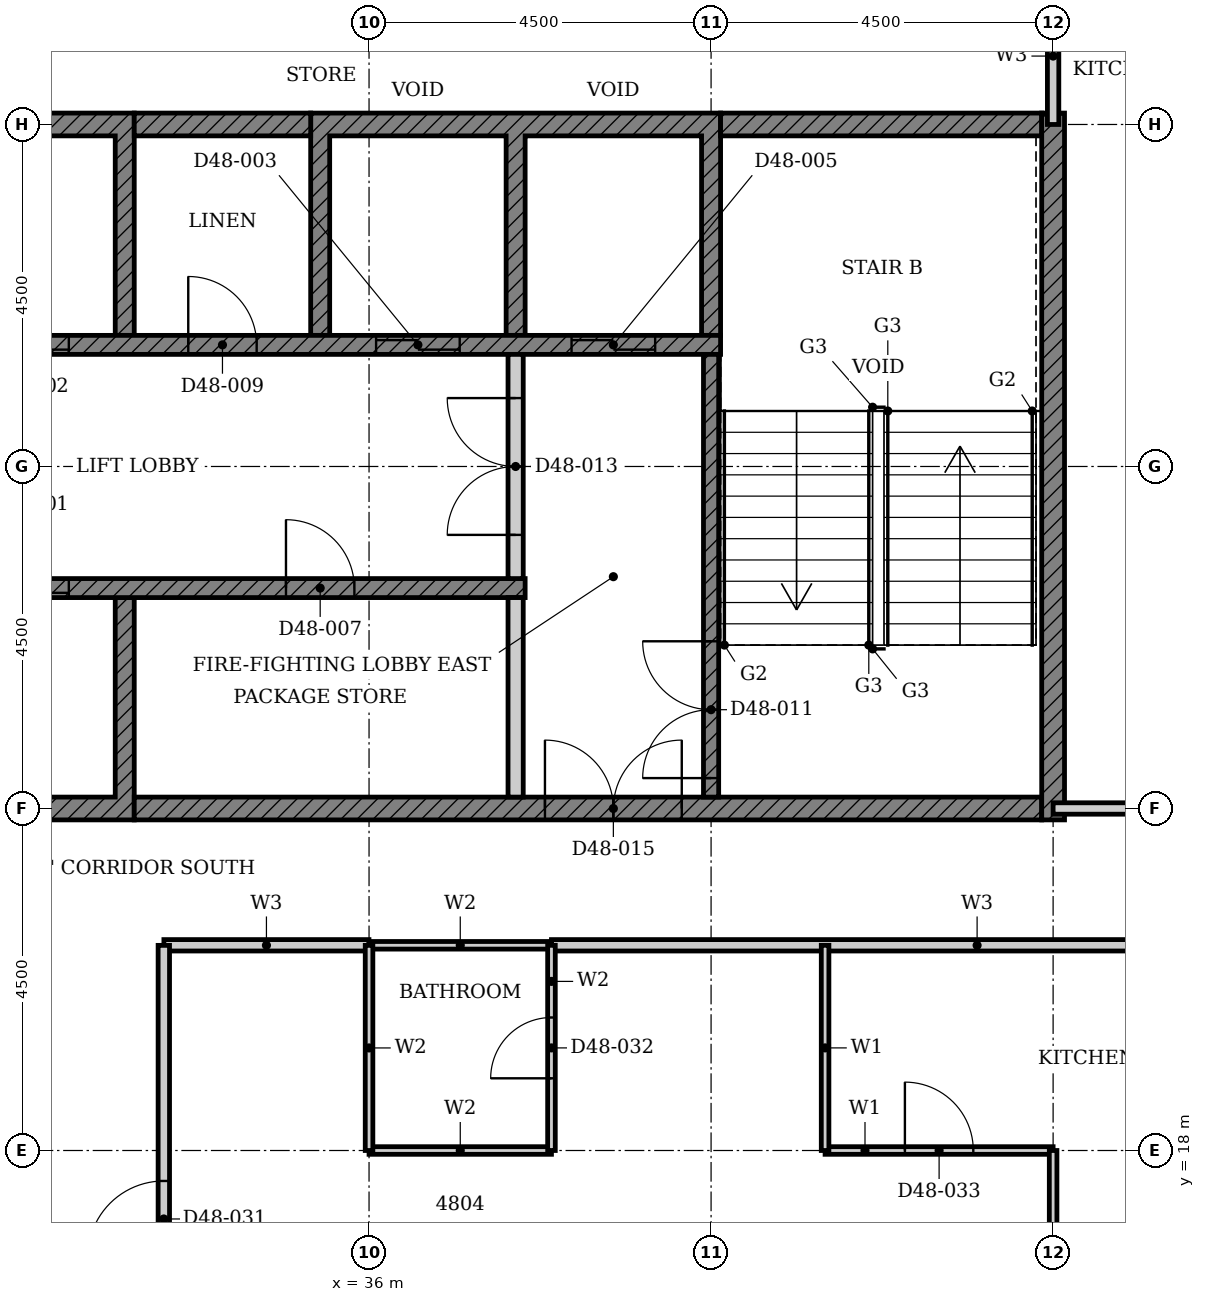
"""IFC4 building model, lengths in metres.
Left out: names, types, materials, properties, quantities, classifications, styles, units other than length and angle.
Written with IfcOpenShell. Run it as: python <this file> out.ifc"""

import sys

from ifc_helpers import new_model, si_unit, direction, frame, frame_2d, origin, place, context, subcontext, project, spatial, polyline, rectangle, outline, extrude, element, fill, save


model = new_model("IFC4")
c1 = context("Model", 3, precision=1e-05, world=origin(), true_north=direction((0.0, 1.0)))
c2 = subcontext(c1, "Body", "Model", "MODEL_VIEW")
j1 = project(units=[si_unit("LENGTHUNIT", "METRE"), si_unit("PLANEANGLEUNIT", "RADIAN")], contexts=[c1])
p1 = place(None, origin())
s1 = spatial("IfcSite", under=j1, at=p1, CompositionType="ELEMENT")
p2 = place(p1, origin())
s2 = spatial("IfcBuilding", under=s1, at=p2, CompositionType="ELEMENT")
p3 = place(p2, frame((0.0, 0.0, 192.4)))
s3 = spatial("IfcBuildingStorey", under=s2, at=p3, CompositionType="ELEMENT", Elevation=192.4)
p4 = place(p3, origin())
e1 = element("IfcWall", 1, at=p4, inside=s3, PredefinedType="SHEAR", context=c2, shape_type="SweptSolid", body=[
    extrude(outline(polyline([(27.518, 22.35), (32.911, 22.35), (32.911, 25.275), (32.661, 25.275), (32.661, 22.65), (30.339, 22.65), (30.339, 25.275), (30.089, 25.275), (30.089, 22.65), (27.768, 22.65), (27.768, 25.275), (27.518, 25.275), (27.518, 22.35)])), origin(), (0.0, 0.0, 1.0), 3.4),
])
p5 = place(p3, origin())
e2 = element("IfcWall", 2, at=p5, inside=s3, PredefinedType="SHEAR", context=c2, shape_type="SweptSolid", body=[
    extrude(outline(polyline([(27.518, 28.725), (27.768, 28.725), (27.768, 31.35), (30.089, 31.35), (30.089, 28.725), (30.339, 28.725), (30.339, 31.35), (32.661, 31.35), (32.661, 28.725), (32.911, 28.725), (32.911, 31.65), (27.518, 31.65), (27.518, 28.725)])), origin(), (0.0, 0.0, 1.0), 3.4),
])
p6 = place(p3, origin())
e3 = element("IfcWall", 3, at=p6, inside=s3, PredefinedType="SHEAR", context=c2, shape_type="SweptSolid", body=[
    extrude(outline(polyline([(35.232, 28.725), (35.482, 28.725), (35.482, 31.35), (37.803, 31.35), (37.803, 28.725), (38.053, 28.725), (38.053, 31.35), (40.375, 31.35), (40.375, 28.725), (40.625, 28.725), (40.625, 31.65), (35.232, 31.65), (35.232, 28.725)])), origin(), (0.0, 0.0, 1.0), 3.4),
])
p7 = place(p3, frame((32.911, 22.5, 0.0), z_axis=(0.0, 0.0, 1.0), x_axis=(1.0, 0.0, 0.0)))
e4 = element("IfcWall", 4, at=p7, inside=s3, PredefinedType="SHEAR", context=c2, shape_type="SweptSolid", body=[
    extrude(rectangle(XDim=11.939, YDim=0.3, at=frame_2d((5.97, 0.0))), origin(), (0.0, 0.0, 1.0), 3.4),
])
p8 = place(p7, frame((5.404, 0.0, 0.0)))
e5 = element("IfcOpeningElement", 5, at=p8, cuts=e4, PredefinedType="OPENING", context=c2, shape_type="SweptSolid", body=[
    extrude(rectangle(XDim=1.8, YDim=2.1, at=frame_2d((0.9, 1.05))), frame((0.0, 0.16, 0.0), z_axis=(0.0, -1.0, 0.0), x_axis=(1.0, 0.0, 0.0)), (0.0, 0.0, 1.0), 0.32),
])
p9 = place(p3, frame((32.911, 31.5, 0.0), z_axis=(0.0, 0.0, 1.0), x_axis=(1.0, 0.0, 0.0)))
e6 = element("IfcWall", 6, at=p9, inside=s3, PredefinedType="SHEAR", context=c2, shape_type="SweptSolid", body=[
    extrude(rectangle(XDim=2.322, YDim=0.3, at=frame_2d((1.161, 0.0))), origin(), (0.0, 0.0, 1.0), 3.4),
])
p10 = place(p3, frame((40.625, 31.5, 0.0), z_axis=(0.0, 0.0, 1.0), x_axis=(1.0, 0.0, 0.0)))
e7 = element("IfcWall", 7, at=p10, inside=s3, PredefinedType="SHEAR", context=c2, shape_type="SweptSolid", body=[
    extrude(rectangle(XDim=4.225, YDim=0.3, at=frame_2d((2.113, 0.0))), origin(), (0.0, 0.0, 1.0), 3.4),
])
p11 = place(p3, frame((45.0, 22.35, 0.0), z_axis=(0.0, 0.0, 1.0), x_axis=(0.0, 1.0, 0.0)))
e8 = element("IfcWall", 8, at=p11, inside=s3, PredefinedType="SHEAR", context=c2, shape_type="SweptSolid", body=[
    extrude(rectangle(XDim=9.3, YDim=0.3, at=frame_2d((4.65, 0.0))), origin(), (0.0, 0.0, 1.0), 3.4),
])
p12 = place(p3, frame((22.375, 25.4, 0.0), z_axis=(0.0, 0.0, 1.0), x_axis=(1.0, 0.0, 0.0)))
e9 = element("IfcWall", 9, at=p12, inside=s3, PredefinedType="SHEAR", context=c2, shape_type="SweptSolid", body=[
    extrude(rectangle(XDim=15.678, YDim=0.25, at=frame_2d((7.839, 0.0))), origin(), (0.0, 0.0, 1.0), 3.4),
])
p13 = place(p12, frame((8.575, 0.0, 0.0)))
e10 = element("IfcOpeningElement", 10, at=p13, cuts=e9, PredefinedType="OPENING", context=c2, shape_type="SweptSolid", body=[
    extrude(rectangle(XDim=1.1, YDim=2.1, at=frame_2d((0.55, 1.05))), frame((0.0, 0.135, 0.0), z_axis=(0.0, -1.0, 0.0), x_axis=(1.0, 0.0, 0.0)), (0.0, 0.0, 1.0), 0.27),
])
p14 = place(p12, frame((0.861, 0.0, 0.0)))
e11 = element("IfcOpeningElement", 11, at=p14, cuts=e9, PredefinedType="OPENING", context=c2, shape_type="SweptSolid", body=[
    extrude(rectangle(XDim=1.1, YDim=2.1, at=frame_2d((0.55, 1.05))), frame((0.0, 0.135, 0.0), z_axis=(0.0, -1.0, 0.0), x_axis=(1.0, 0.0, 0.0)), (0.0, 0.0, 1.0), 0.27),
])
p15 = place(p12, frame((3.532, 0.0, 0.0)))
e12 = element("IfcOpeningElement", 12, at=p15, cuts=e9, PredefinedType="OPENING", context=c2, shape_type="SweptSolid", body=[
    extrude(rectangle(XDim=0.9, YDim=2.1, at=frame_2d((0.45, 1.05))), frame((0.0, 0.135, 0.0), z_axis=(0.0, -1.0, 0.0), x_axis=(1.0, 0.0, 0.0)), (0.0, 0.0, 1.0), 0.27),
])
p16 = place(p12, frame((12.532, 0.0, 0.0)))
e13 = element("IfcOpeningElement", 13, at=p16, cuts=e9, PredefinedType="OPENING", context=c2, shape_type="SweptSolid", body=[
    extrude(rectangle(XDim=0.9, YDim=2.1, at=frame_2d((0.45, 1.05))), frame((0.0, 0.135, 0.0), z_axis=(0.0, -1.0, 0.0), x_axis=(1.0, 0.0, 0.0)), (0.0, 0.0, 1.0), 0.27),
])
p17 = place(p3, frame((24.947, 28.6, 0.0), z_axis=(0.0, 0.0, 1.0), x_axis=(1.0, 0.0, 0.0)))
e14 = element("IfcWall", 14, at=p17, inside=s3, PredefinedType="SHEAR", context=c2, shape_type="SweptSolid", body=[
    extrude(rectangle(XDim=15.678, YDim=0.25, at=frame_2d((7.839, 0.0))), origin(), (0.0, 0.0, 1.0), 3.4),
])
p18 = place(p17, frame((6.004, 0.0, 0.0)))
e15 = element("IfcOpeningElement", 15, at=p18, cuts=e14, PredefinedType="OPENING", context=c2, shape_type="SweptSolid", body=[
    extrude(rectangle(XDim=1.1, YDim=2.1, at=frame_2d((0.55, 1.05))), frame((0.0, 0.135, 0.0), z_axis=(0.0, -1.0, 0.0), x_axis=(1.0, 0.0, 0.0)), (0.0, 0.0, 1.0), 0.27),
])
p19 = place(p17, frame((11.146, 0.0, 0.0)))
e16 = element("IfcOpeningElement", 16, at=p19, cuts=e14, PredefinedType="OPENING", context=c2, shape_type="SweptSolid", body=[
    extrude(rectangle(XDim=1.1, YDim=2.1, at=frame_2d((0.55, 1.05))), frame((0.0, 0.135, 0.0), z_axis=(0.0, -1.0, 0.0), x_axis=(1.0, 0.0, 0.0)), (0.0, 0.0, 1.0), 0.27),
])
p20 = place(p17, frame((13.718, 0.0, 0.0)))
e17 = element("IfcOpeningElement", 17, at=p20, cuts=e14, PredefinedType="OPENING", context=c2, shape_type="SweptSolid", body=[
    extrude(rectangle(XDim=1.1, YDim=2.1, at=frame_2d((0.55, 1.05))), frame((0.0, 0.135, 0.0), z_axis=(0.0, -1.0, 0.0), x_axis=(1.0, 0.0, 0.0)), (0.0, 0.0, 1.0), 0.27),
])
p21 = place(p17, frame((0.961, 0.0, 0.0)))
e18 = element("IfcOpeningElement", 18, at=p21, cuts=e14, PredefinedType="OPENING", context=c2, shape_type="SweptSolid", body=[
    extrude(rectangle(XDim=0.9, YDim=2.1, at=frame_2d((0.45, 1.05))), frame((0.0, 0.135, 0.0), z_axis=(0.0, -1.0, 0.0), x_axis=(1.0, 0.0, 0.0)), (0.0, 0.0, 1.0), 0.27),
])
p22 = place(p17, frame((8.675, 0.0, 0.0)))
e19 = element("IfcOpeningElement", 19, at=p22, cuts=e14, PredefinedType="OPENING", context=c2, shape_type="SweptSolid", body=[
    extrude(rectangle(XDim=0.9, YDim=2.1, at=frame_2d((0.45, 1.05))), frame((0.0, 0.135, 0.0), z_axis=(0.0, -1.0, 0.0), x_axis=(1.0, 0.0, 0.0)), (0.0, 0.0, 1.0), 0.27),
])
p23 = place(p3, frame((37.928, 22.65, 0.0), z_axis=(0.0, 0.0, 1.0), x_axis=(0.0, 1.0, 0.0)))
e20 = element("IfcWall", 20, at=p23, inside=s3, PredefinedType="PARTITIONING", context=c2, shape_type="SweptSolid", body=[
    extrude(rectangle(XDim=2.625, YDim=0.2, at=frame_2d((1.312, 0.0))), origin(), (0.0, 0.0, 1.0), 3.4),
])
p24 = place(p3, frame((40.5, 22.65, 0.0), z_axis=(0.0, 0.0, 1.0), x_axis=(0.0, 1.0, 0.0)))
e21 = element("IfcWall", 21, at=p24, inside=s3, PredefinedType="SHEAR", context=c2, shape_type="SweptSolid", body=[
    extrude(rectangle(XDim=5.825, YDim=0.2, at=frame_2d((2.913, 0.0))), origin(), (0.0, 0.0, 1.0), 3.4),
])
p25 = place(p24, frame((0.25, 0.0, 0.0)))
e22 = element("IfcOpeningElement", 22, at=p25, cuts=e21, PredefinedType="OPENING", context=c2, shape_type="SweptSolid", body=[
    extrude(rectangle(XDim=1.8, YDim=2.1, at=frame_2d((0.9, 1.05))), frame((0.0, 0.11, 0.0), z_axis=(0.0, -1.0, 0.0), x_axis=(1.0, 0.0, 0.0)), (0.0, 0.0, 1.0), 0.22),
])
p26 = place(p3, frame((37.928, 25.525, 0.0), z_axis=(0.0, 0.0, 1.0), x_axis=(0.0, 1.0, 0.0)))
e23 = element("IfcWall", 23, at=p26, inside=s3, PredefinedType="PARTITIONING", context=c2, shape_type="SweptSolid", body=[
    extrude(rectangle(XDim=2.95, YDim=0.2, at=frame_2d((1.475, 0.0))), origin(), (0.0, 0.0, 1.0), 3.4),
])
p27 = place(p26, frame((0.575, 0.0, 0.0)))
e24 = element("IfcOpeningElement", 24, at=p27, cuts=e23, PredefinedType="OPENING", context=c2, shape_type="SweptSolid", body=[
    extrude(rectangle(XDim=1.8, YDim=2.1, at=frame_2d((0.9, 1.05))), frame((0.0, 0.11, 0.0), z_axis=(0.0, -1.0, 0.0), x_axis=(1.0, 0.0, 0.0)), (0.0, 0.0, 1.0), 0.22),
])
p28 = place(p3, frame((33.301, 20.7, 0.0), z_axis=(0.0, 0.0, 1.0), x_axis=(1.0, 0.0, 0.0)))
e25 = element("IfcWall", 25, at=p28, inside=s3, PredefinedType="PARTITIONING", context=c2, shape_type="SweptSolid", body=[
    extrude(rectangle(XDim=2.698, YDim=0.15, at=frame_2d((1.349, 0.0))), origin(), (0.0, 0.0, 1.0), 3.4),
])
p29 = place(p3, frame((38.4, 20.7, 0.0), z_axis=(0.0, 0.0, 1.0), x_axis=(1.0, 0.0, 0.0)))
e26 = element("IfcWall", 26, at=p29, inside=s3, PredefinedType="PARTITIONING", context=c2, shape_type="SweptSolid", body=[
    extrude(rectangle(XDim=11.2, YDim=0.15, at=frame_2d((5.6, 0.0))), origin(), (0.0, 0.0, 1.0), 3.4),
])
p30 = place(p3, frame((45.0, 22.5, 0.0), z_axis=(0.0, 0.0, 1.0), x_axis=(1.0, 0.0, 0.0)))
e27 = element("IfcWall", 27, at=p30, inside=s3, PredefinedType="PARTITIONING", context=c2, shape_type="SweptSolid", body=[
    extrude(rectangle(XDim=4.79, YDim=0.15, at=frame_2d((2.395, 0.0))), origin(), (0.0, 0.0, 1.0), 3.4),
])
p31 = place(p30, frame((1.75, 0.0, 0.0)))
e28 = element("IfcOpeningElement", 28, at=p31, cuts=e27, PredefinedType="OPENING", context=c2, shape_type="SweptSolid", body=[
    extrude(rectangle(XDim=1.0, YDim=2.2, at=frame_2d((0.5, 1.1))), frame((0.0, 0.085, 0.0), z_axis=(0.0, -1.0, 0.0), x_axis=(1.0, 0.0, 0.0)), (0.0, 0.0, 1.0), 0.17),
])
p32 = place(p3, frame((33.3, 6.9, 0.0), z_axis=(0.0, 0.0, 1.0), x_axis=(0.0, 1.0, 0.0)))
e29 = element("IfcWall", 29, at=p32, inside=s3, PredefinedType="PARTITIONING", context=c2, shape_type="SweptSolid", body=[
    extrude(rectangle(XDim=13.799, YDim=0.15, at=frame_2d((6.899, 0.0))), origin(), (0.0, 0.0, 1.0), 3.4),
])
p33 = place(p32, frame((9.699, 0.0, 0.0)))
e30 = element("IfcOpeningElement", 30, at=p33, cuts=e29, PredefinedType="OPENING", context=c2, shape_type="SweptSolid", body=[
    extrude(rectangle(XDim=1.0, YDim=2.2, at=frame_2d((0.5, 1.1))), frame((0.0, 0.085, 0.0), z_axis=(0.0, -1.0, 0.0), x_axis=(1.0, 0.0, 0.0)), (0.0, 0.0, 1.0), 0.17),
])
p34 = place(p32, frame((1.3, 0.0, 0.0)))
e31 = element("IfcOpeningElement", 31, at=p34, cuts=e29, PredefinedType="OPENING", context=c2, shape_type="SweptSolid", body=[
    extrude(rectangle(XDim=1.0, YDim=2.2, at=frame_2d((0.5, 1.1))), frame((0.0, 0.085, 0.0), z_axis=(0.0, -1.0, 0.0), x_axis=(1.0, 0.0, 0.0)), (0.0, 0.0, 1.0), 0.17),
])
p35 = place(p3, frame((45.0, 31.5, 0.0), z_axis=(0.0, 0.0, 1.0), x_axis=(0.0, 1.0, 0.0)))
e32 = element("IfcWall", 32, at=p35, inside=s3, PredefinedType="PARTITIONING", context=c2, shape_type="SweptSolid", body=[
    extrude(rectangle(XDim=1.8, YDim=0.15, at=frame_2d((0.9, 0.0))), origin(), (0.0, 0.0, 1.0), 3.4),
])
p36 = place(p3, frame((42.0, 18.0, 0.0), z_axis=(0.0, 0.0, 1.0), x_axis=(1.0, 0.0, 0.0)))
e33 = element("IfcWall", 33, at=p36, inside=s3, PredefinedType="PARTITIONING", context=c2, shape_type="SweptSolid", body=[
    extrude(rectangle(XDim=3.0, YDim=0.1, at=frame_2d((1.5, 0.0))), origin(), (0.0, 0.0, 1.0), 3.4),
])
p37 = place(p36, frame((1.05, 0.0, 0.0)))
e34 = element("IfcOpeningElement", 34, at=p37, cuts=e33, PredefinedType="OPENING", context=c2, shape_type="SweptSolid", body=[
    extrude(rectangle(XDim=0.9, YDim=2.1, at=frame_2d((0.45, 1.05))), frame((0.0, 0.06, 0.0), z_axis=(0.0, -1.0, 0.0), x_axis=(1.0, 0.0, 0.0)), (0.0, 0.0, 1.0), 0.12),
])
p38 = place(p3, frame((42.0, 18.0, 0.0), z_axis=(0.0, 0.0, 1.0), x_axis=(0.0, 1.0, 0.0)))
e35 = element("IfcWall", 35, at=p38, inside=s3, PredefinedType="PARTITIONING", context=c2, shape_type="SweptSolid", body=[
    extrude(rectangle(XDim=2.7, YDim=0.1, at=frame_2d((1.35, 0.0))), origin(), (0.0, 0.0, 1.0), 3.4),
])
p39 = place(p3, frame((45.0, 15.56, 0.0), z_axis=(0.0, 0.0, 1.0), x_axis=(0.0, 1.0, 0.0)))
e36 = element("IfcWall", 36, at=p39, inside=s3, PredefinedType="PARTITIONING", context=c2, shape_type="SweptSolid", body=[
    extrude(rectangle(XDim=2.44, YDim=0.1, at=frame_2d((1.22, 0.0))), origin(), (0.0, 0.0, 1.0), 3.4),
])
for number, where, z_axis, x_axis in (
    (37, (36.0, 18.0, 0.0), (0.0, 0.0, 1.0), (1.0, 0.0, 0.0)),
    (38, (36.0, 20.7, 0.0), (0.0, 0.0, 1.0), (1.0, 0.0, 0.0)),
):
    element("IfcWall", number, at=place(p3, frame(where, z_axis=z_axis, x_axis=x_axis)), inside=s3, PredefinedType="PARTITIONING", context=c2, shape_type="SweptSolid", body=[
        extrude(rectangle(XDim=2.4, YDim=0.1, at=frame_2d((1.2, 0.0))), origin(), (0.0, 0.0, 1.0), 3.4),
    ])
p40 = place(p3, frame((36.0, 18.0, 0.0), z_axis=(0.0, 0.0, 1.0), x_axis=(0.0, 1.0, 0.0)))
e39 = element("IfcWall", 39, at=p40, inside=s3, PredefinedType="PARTITIONING", context=c2, shape_type="SweptSolid", body=[
    extrude(rectangle(XDim=2.699, YDim=0.1, at=frame_2d((1.35, 0.0))), origin(), (0.0, 0.0, 1.0), 3.4),
])
p41 = place(p3, frame((38.4, 18.0, 0.0), z_axis=(0.0, 0.0, 1.0), x_axis=(0.0, 1.0, 0.0)))
e40 = element("IfcWall", 40, at=p41, inside=s3, PredefinedType="PARTITIONING", context=c2, shape_type="SweptSolid", body=[
    extrude(rectangle(XDim=2.7, YDim=0.1, at=frame_2d((1.35, 0.0))), origin(), (0.0, 0.0, 1.0), 3.4),
])
p42 = place(p41, frame((0.95, 0.0, 0.0)))
e41 = element("IfcOpeningElement", 41, at=p42, cuts=e40, PredefinedType="OPENING", context=c2, shape_type="SweptSolid", body=[
    extrude(rectangle(XDim=0.8, YDim=2.1, at=frame_2d((0.4, 1.05))), frame((0.0, 0.06, 0.0), z_axis=(0.0, -1.0, 0.0), x_axis=(1.0, 0.0, 0.0)), (0.0, 0.0, 1.0), 0.12),
])
p43 = place(p13, origin())
e42 = element("IfcDoor", 42, at=p43, inside=s3, OperationType="DOUBLE_DOOR_SLIDING", PredefinedType="DOOR", context=c2, shape_type="SweptSolid", body=[
    extrude(rectangle(XDim=1.1, YDim=2.1, at=frame_2d((0.55, 1.05))), frame((0.0, 0.025, 0.0), z_axis=(0.0, -1.0, 0.0), x_axis=(1.0, 0.0, 0.0)), (0.0, 0.0, 1.0), 0.05),
])
fill(e10, e42)
p44 = place(p18, origin())
e43 = element("IfcDoor", 43, at=p44, inside=s3, OperationType="DOUBLE_DOOR_SLIDING", PredefinedType="DOOR", context=c2, shape_type="SweptSolid", body=[
    extrude(rectangle(XDim=1.1, YDim=2.1, at=frame_2d((0.55, 1.05))), frame((0.0, 0.025, 0.0), z_axis=(0.0, -1.0, 0.0), x_axis=(1.0, 0.0, 0.0)), (0.0, 0.0, 1.0), 0.05),
])
fill(e15, e43)
p45 = place(p19, origin())
e44 = element("IfcDoor", 44, at=p45, inside=s3, OperationType="DOUBLE_DOOR_SLIDING", PredefinedType="DOOR", context=c2, shape_type="SweptSolid", body=[
    extrude(rectangle(XDim=1.1, YDim=2.1, at=frame_2d((0.55, 1.05))), frame((0.0, 0.025, 0.0), z_axis=(0.0, -1.0, 0.0), x_axis=(1.0, 0.0, 0.0)), (0.0, 0.0, 1.0), 0.05),
])
fill(e16, e44)
p46 = place(p20, origin())
e45 = element("IfcDoor", 45, at=p46, inside=s3, OperationType="DOUBLE_DOOR_SLIDING", PredefinedType="DOOR", context=c2, shape_type="SweptSolid", body=[
    extrude(rectangle(XDim=1.1, YDim=2.1, at=frame_2d((0.55, 1.05))), frame((0.0, 0.025, 0.0), z_axis=(0.0, -1.0, 0.0), x_axis=(1.0, 0.0, 0.0)), (0.0, 0.0, 1.0), 0.05),
])
fill(e17, e45)
p47 = place(p16, origin())
e46 = element("IfcDoor", 46, at=p47, inside=s3, OperationType="SINGLE_SWING_LEFT", PredefinedType="DOOR", context=c2, shape_type="SweptSolid", body=[
    extrude(rectangle(XDim=0.9, YDim=2.1, at=frame_2d((0.45, 1.05))), frame((0.0, 0.025, 0.0), z_axis=(0.0, -1.0, 0.0), x_axis=(1.0, 0.0, 0.0)), (0.0, 0.0, 1.0), 0.05),
])
fill(e13, e46)
p48 = place(p22, origin())
e47 = element("IfcDoor", 47, at=p48, inside=s3, OperationType="SINGLE_SWING_LEFT", PredefinedType="DOOR", context=c2, shape_type="SweptSolid", body=[
    extrude(rectangle(XDim=0.9, YDim=2.1, at=frame_2d((0.45, 1.05))), frame((0.0, 0.025, 0.0), z_axis=(0.0, -1.0, 0.0), x_axis=(1.0, 0.0, 0.0)), (0.0, 0.0, 1.0), 0.05),
])
fill(e19, e47)
p49 = place(p25, origin())
e48 = element("IfcDoor", 48, at=p49, inside=s3, OperationType="DOUBLE_DOOR_SINGLE_SWING", PredefinedType="DOOR", context=c2, shape_type="SweptSolid", body=[
    extrude(rectangle(XDim=1.8, YDim=2.1, at=frame_2d((0.9, 1.05))), frame((0.0, 0.025, 0.0), z_axis=(0.0, -1.0, 0.0), x_axis=(1.0, 0.0, 0.0)), (0.0, 0.0, 1.0), 0.05),
])
fill(e22, e48)
p50 = place(p27, origin())
e49 = element("IfcDoor", 49, at=p50, inside=s3, OperationType="DOUBLE_DOOR_SINGLE_SWING", PredefinedType="DOOR", context=c2, shape_type="SweptSolid", body=[
    extrude(rectangle(XDim=1.8, YDim=2.1, at=frame_2d((0.9, 1.05))), frame((0.0, 0.025, 0.0), z_axis=(0.0, -1.0, 0.0), x_axis=(1.0, 0.0, 0.0)), (0.0, 0.0, 1.0), 0.05),
])
fill(e24, e49)
p51 = place(p8, origin())
e50 = element("IfcDoor", 50, at=p51, inside=s3, OperationType="DOUBLE_DOOR_SINGLE_SWING", PredefinedType="DOOR", context=c2, shape_type="SweptSolid", body=[
    extrude(rectangle(XDim=1.8, YDim=2.1, at=frame_2d((0.9, 1.05))), frame((0.0, 0.025, 0.0), z_axis=(0.0, -1.0, 0.0), x_axis=(1.0, 0.0, 0.0)), (0.0, 0.0, 1.0), 0.05),
])
fill(e5, e50)
p52 = place(p33, origin())
e51 = element("IfcDoor", 51, at=p52, inside=s3, OperationType="SINGLE_SWING_RIGHT", PredefinedType="DOOR", context=c2, shape_type="SweptSolid", body=[
    extrude(rectangle(XDim=1.0, YDim=2.2, at=frame_2d((0.5, 1.1))), frame((0.0, 0.025, 0.0), z_axis=(0.0, -1.0, 0.0), x_axis=(1.0, 0.0, 0.0)), (0.0, 0.0, 1.0), 0.05),
])
fill(e30, e51)
p53 = place(p42, origin())
e52 = element("IfcDoor", 52, at=p53, inside=s3, OperationType="SINGLE_SWING_RIGHT", PredefinedType="DOOR", context=c2, shape_type="SweptSolid", body=[
    extrude(rectangle(XDim=0.8, YDim=2.1, at=frame_2d((0.4, 1.05))), frame((0.0, 0.025, 0.0), z_axis=(0.0, -1.0, 0.0), x_axis=(1.0, 0.0, 0.0)), (0.0, 0.0, 1.0), 0.05),
])
fill(e41, e52)
p54 = place(p37, origin())
e53 = element("IfcDoor", 53, at=p54, inside=s3, OperationType="SINGLE_SWING_LEFT", PredefinedType="DOOR", context=c2, shape_type="SweptSolid", body=[
    extrude(rectangle(XDim=0.9, YDim=2.1, at=frame_2d((0.45, 1.05))), frame((0.0, 0.025, 0.0), z_axis=(0.0, -1.0, 0.0), x_axis=(1.0, 0.0, 0.0)), (0.0, 0.0, 1.0), 0.05),
])
fill(e34, e53)
save(model, sys.argv[1])
